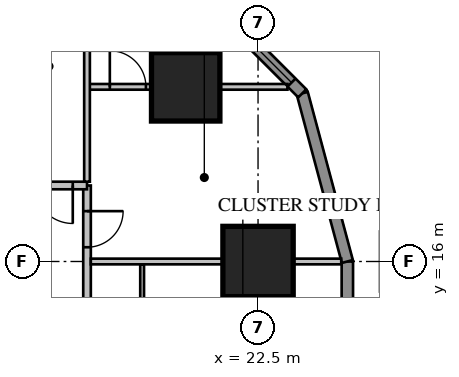
"""IFC4 building model, lengths in metres.
Left out: names, types, materials, properties, quantities, classifications, styles, units other than length and angle.
Written with IfcOpenShell. Run it as: python <this file> out.ifc"""

import sys

from ifc_helpers import new_model, si_unit, direction, frame, frame_2d, origin, origin_2d, place, context, subcontext, project, spatial, rectangle, extrude, element, fill, save


model = new_model("IFC4")
c1 = context("Model", 3, precision=1e-05, world=origin(), true_north=direction((0.0, 1.0)))
c2 = subcontext(c1, "Body", "Model", "MODEL_VIEW")
j1 = project(units=[si_unit("LENGTHUNIT", "METRE"), si_unit("PLANEANGLEUNIT", "RADIAN")], contexts=[c1])
p1 = place(None, origin())
s1 = spatial("IfcSite", under=j1, at=p1, CompositionType="ELEMENT")
p2 = place(p1, origin())
s2 = spatial("IfcBuilding", under=s1, at=p2, CompositionType="ELEMENT")
p3 = place(p2, frame((0.0, 0.0, 27.55)))
s3 = spatial("IfcBuildingStorey", under=s2, at=p3, CompositionType="ELEMENT", Elevation=27.55)
p4 = place(p3, frame((22.5, 16.0, 0.0), z_axis=(0.0, 0.0, 1.0), x_axis=(1.0, 0.0, 0.0)))
e1 = element("IfcColumn", 1, at=p4, inside=s3, PredefinedType="COLUMN", context=c2, shape_type="SweptSolid", body=[
    extrude(rectangle(XDim=1.85, YDim=1.85, at=origin_2d()), origin(), (0.0, 0.0, 1.0), 3.85),
])
p5 = place(p3, frame((20.596, 20.596, 0.0), z_axis=(0.0, 0.0, 1.0), x_axis=(1.0, 0.0, 0.0)))
e2 = element("IfcColumn", 2, at=p5, inside=s3, PredefinedType="COLUMN", context=c2, shape_type="SweptSolid", body=[
    extrude(rectangle(XDim=1.8, YDim=1.8, at=origin_2d()), origin(), (0.0, 0.0, 1.0), 3.85),
])
p6 = place(p3, frame((24.85, -16.0, 0.0), z_axis=(0.0, 0.0, 1.0), x_axis=(0.0, 1.0, 0.0)))
e3 = element("IfcWall", 3, at=p6, inside=s3, PredefinedType="SOLIDWALL", context=c2, shape_type="SweptSolid", body=[
    extrude(rectangle(XDim=32.0, YDim=0.3, at=frame_2d((16.0, 0.0))), origin(), (0.0, 0.0, 1.0), 3.65),
])
p7 = place(p6, frame((1.2, 0.0, 0.75)))
e4 = element("IfcOpeningElement", 4, at=p7, cuts=e3, PredefinedType="OPENING", context=c2, shape_type="SweptSolid", body=[
    extrude(rectangle(XDim=1.6, YDim=1.8, at=frame_2d((0.8, 0.9))), frame((0.0, 0.17, 0.0), z_axis=(0.0, -1.0, 0.0), x_axis=(1.0, 0.0, 0.0)), (0.0, 0.0, 1.0), 0.34),
])
p8 = place(p6, frame((5.2, 0.0, 0.75)))
e5 = element("IfcOpeningElement", 5, at=p8, cuts=e3, PredefinedType="OPENING", context=c2, shape_type="SweptSolid", body=[
    extrude(rectangle(XDim=1.6, YDim=1.8, at=frame_2d((0.8, 0.9))), frame((0.0, 0.17, 0.0), z_axis=(0.0, -1.0, 0.0), x_axis=(1.0, 0.0, 0.0)), (0.0, 0.0, 1.0), 0.34),
])
p9 = place(p6, frame((17.2, 0.0, 0.75)))
e6 = element("IfcOpeningElement", 6, at=p9, cuts=e3, PredefinedType="OPENING", context=c2, shape_type="SweptSolid", body=[
    extrude(rectangle(XDim=1.6, YDim=1.8, at=frame_2d((0.8, 0.9))), frame((0.0, 0.17, 0.0), z_axis=(0.0, -1.0, 0.0), x_axis=(1.0, 0.0, 0.0)), (0.0, 0.0, 1.0), 0.34),
])
p10 = place(p6, frame((21.2, 0.0, 0.75)))
e7 = element("IfcOpeningElement", 7, at=p10, cuts=e3, PredefinedType="OPENING", context=c2, shape_type="SweptSolid", body=[
    extrude(rectangle(XDim=1.6, YDim=1.8, at=frame_2d((0.8, 0.9))), frame((0.0, 0.17, 0.0), z_axis=(0.0, -1.0, 0.0), x_axis=(1.0, 0.0, 0.0)), (0.0, 0.0, 1.0), 0.34),
])
p11 = place(p6, frame((25.2, 0.0, 0.75)))
e8 = element("IfcOpeningElement", 8, at=p11, cuts=e3, PredefinedType="OPENING", context=c2, shape_type="SweptSolid", body=[
    extrude(rectangle(XDim=1.6, YDim=1.8, at=frame_2d((0.8, 0.9))), frame((0.0, 0.17, 0.0), z_axis=(0.0, -1.0, 0.0), x_axis=(1.0, 0.0, 0.0)), (0.0, 0.0, 1.0), 0.34),
])
p12 = place(p6, frame((29.2, 0.0, 0.75)))
e9 = element("IfcOpeningElement", 9, at=p12, cuts=e3, PredefinedType="OPENING", context=c2, shape_type="SweptSolid", body=[
    extrude(rectangle(XDim=1.6, YDim=1.8, at=frame_2d((0.8, 0.9))), frame((0.0, 0.17, 0.0), z_axis=(0.0, -1.0, 0.0), x_axis=(1.0, 0.0, 0.0)), (0.0, 0.0, 1.0), 0.34),
])
p13 = place(p6, frame((8.8, 0.0, 0.75)))
e10 = element("IfcOpeningElement", 10, at=p13, cuts=e3, PredefinedType="OPENING", context=c2, shape_type="SweptSolid", body=[
    extrude(rectangle(XDim=2.4, YDim=1.8, at=frame_2d((1.2, 0.9))), frame((0.0, 0.17, 0.0), z_axis=(0.0, -1.0, 0.0), x_axis=(1.0, 0.0, 0.0)), (0.0, 0.0, 1.0), 0.34),
])
p14 = place(p6, frame((13.812, 0.0, 0.0)))
e11 = element("IfcOpeningElement", 11, at=p14, cuts=e3, PredefinedType="OPENING", context=c2, shape_type="SweptSolid", body=[
    extrude(rectangle(XDim=1.0, YDim=2.4, at=frame_2d((0.5, 1.2))), frame((0.0, 0.17, 0.0), z_axis=(0.0, -1.0, 0.0), x_axis=(1.0, 0.0, 0.0)), (0.0, 0.0, 1.0), 0.34),
])
p15 = place(p3, frame((24.85, 16.0, 0.0), z_axis=(0.0, 0.0, 1.0), x_axis=(-0.258839972501, 0.965920218567, 0.0)))
e12 = element("IfcWall", 12, at=p15, inside=s3, PredefinedType="SOLIDWALL", context=c2, shape_type="SweptSolid", body=[
    extrude(rectangle(XDim=4.581, YDim=0.3, at=frame_2d((2.291, 0.0))), origin(), (0.0, 0.0, 1.0), 3.65),
])
p16 = place(p3, frame((23.664, 20.425, 0.0), z_axis=(0.0, 0.0, 1.0), x_axis=(-0.707106781187, 0.707106781187, 0.0)))
e13 = element("IfcWall", 13, at=p16, inside=s3, PredefinedType="SOLIDWALL", context=c2, shape_type="SweptSolid", body=[
    extrude(rectangle(XDim=4.581, YDim=0.3, at=frame_2d((2.291, 0.0))), origin(), (0.0, 0.0, 1.0), 3.65),
])
p17 = place(p16, frame((0.4, 0.0, 0.75)))
e14 = element("IfcOpeningElement", 14, at=p17, cuts=e13, PredefinedType="OPENING", context=c2, shape_type="SweptSolid", body=[
    extrude(rectangle(XDim=3.781, YDim=1.8, at=frame_2d((1.891, 0.9))), frame((0.0, 0.17, 0.0), z_axis=(0.0, -1.0, 0.0), x_axis=(1.0, 0.0, 0.0)), (0.0, 0.0, 1.0), 0.34),
])
p18 = place(p3, frame((18.0, -18.0, 0.0), z_axis=(0.0, 0.0, 1.0), x_axis=(0.0, 1.0, 0.0)))
e15 = element("IfcWall", 15, at=p18, inside=s3, PredefinedType="PARTITIONING", context=c2, shape_type="SweptSolid", body=[
    extrude(rectangle(XDim=36.0, YDim=0.2, at=frame_2d((18.0, 0.0))), origin(), (0.0, 0.0, 1.0), 3.65),
])
p19 = place(p18, frame((10.4, 0.0, 0.0)))
e16 = element("IfcOpeningElement", 16, at=p19, cuts=e15, PredefinedType="OPENING", context=c2, shape_type="SweptSolid", body=[
    extrude(rectangle(XDim=1.0, YDim=2.1, at=frame_2d((0.5, 1.05))), frame((0.0, 0.12, 0.0), z_axis=(0.0, -1.0, 0.0), x_axis=(1.0, 0.0, 0.0)), (0.0, 0.0, 1.0), 0.24),
])
p20 = place(p18, frame((0.375, 0.0, 0.0)))
e17 = element("IfcOpeningElement", 17, at=p20, cuts=e15, PredefinedType="OPENING", context=c2, shape_type="SweptSolid", body=[
    extrude(rectangle(XDim=1.0, YDim=2.1, at=frame_2d((0.5, 1.05))), frame((0.0, 0.12, 0.0), z_axis=(0.0, -1.0, 0.0), x_axis=(1.0, 0.0, 0.0)), (0.0, 0.0, 1.0), 0.24),
])
p21 = place(p18, frame((34.375, 0.0, 0.0)))
e18 = element("IfcOpeningElement", 18, at=p21, cuts=e15, PredefinedType="OPENING", context=c2, shape_type="SweptSolid", body=[
    extrude(rectangle(XDim=0.95, YDim=2.1, at=frame_2d((0.475, 1.05))), frame((0.0, 0.12, 0.0), z_axis=(0.0, -1.0, 0.0), x_axis=(1.0, 0.0, 0.0)), (0.0, 0.0, 1.0), 0.24),
])
p22 = place(p3, frame((19.45, -15.925, 0.0), z_axis=(0.0, 0.0, 1.0), x_axis=(0.0, 1.0, 0.0)))
e19 = element("IfcWall", 19, at=p22, inside=s3, PredefinedType="PARTITIONING", context=c2, shape_type="SweptSolid", body=[
    extrude(rectangle(XDim=31.85, YDim=0.1, at=frame_2d((15.925, 0.0))), origin(), (0.0, 0.0, 1.0), 3.65),
])
p23 = place(p22, frame((10.125, 0.0, 0.0)))
e20 = element("IfcOpeningElement", 20, at=p23, cuts=e19, PredefinedType="OPENING", context=c2, shape_type="SweptSolid", body=[
    extrude(rectangle(XDim=1.0, YDim=2.1, at=frame_2d((0.5, 1.05))), frame((0.0, 0.07, 0.0), z_axis=(0.0, -1.0, 0.0), x_axis=(1.0, 0.0, 0.0)), (0.0, 0.0, 1.0), 0.14),
])
p24 = place(p22, frame((8.3, 0.0, 0.0)))
e21 = element("IfcOpeningElement", 21, at=p24, cuts=e19, PredefinedType="OPENING", context=c2, shape_type="SweptSolid", body=[
    extrude(rectangle(XDim=0.8, YDim=2.1, at=frame_2d((0.4, 1.05))), frame((0.0, 0.07, 0.0), z_axis=(0.0, -1.0, 0.0), x_axis=(1.0, 0.0, 0.0)), (0.0, 0.0, 1.0), 0.14),
])
p25 = place(p22, frame((1.725, 0.0, 0.0)))
e22 = element("IfcOpeningElement", 22, at=p25, cuts=e19, PredefinedType="OPENING", context=c2, shape_type="SweptSolid", body=[
    extrude(rectangle(XDim=0.95, YDim=2.1, at=frame_2d((0.475, 1.05))), frame((0.0, 0.07, 0.0), z_axis=(0.0, -1.0, 0.0), x_axis=(1.0, 0.0, 0.0)), (0.0, 0.0, 1.0), 0.14),
])
p26 = place(p22, frame((5.725, 0.0, 0.0)))
e23 = element("IfcOpeningElement", 23, at=p26, cuts=e19, PredefinedType="OPENING", context=c2, shape_type="SweptSolid", body=[
    extrude(rectangle(XDim=0.95, YDim=2.1, at=frame_2d((0.475, 1.05))), frame((0.0, 0.07, 0.0), z_axis=(0.0, -1.0, 0.0), x_axis=(1.0, 0.0, 0.0)), (0.0, 0.0, 1.0), 0.14),
])
p27 = place(p22, frame((17.725, 0.0, 0.0)))
e24 = element("IfcOpeningElement", 24, at=p27, cuts=e19, PredefinedType="OPENING", context=c2, shape_type="SweptSolid", body=[
    extrude(rectangle(XDim=0.95, YDim=2.1, at=frame_2d((0.475, 1.05))), frame((0.0, 0.07, 0.0), z_axis=(0.0, -1.0, 0.0), x_axis=(1.0, 0.0, 0.0)), (0.0, 0.0, 1.0), 0.14),
])
p28 = place(p22, frame((21.725, 0.0, 0.0)))
e25 = element("IfcOpeningElement", 25, at=p28, cuts=e19, PredefinedType="OPENING", context=c2, shape_type="SweptSolid", body=[
    extrude(rectangle(XDim=0.95, YDim=2.1, at=frame_2d((0.475, 1.05))), frame((0.0, 0.07, 0.0), z_axis=(0.0, -1.0, 0.0), x_axis=(1.0, 0.0, 0.0)), (0.0, 0.0, 1.0), 0.14),
])
p29 = place(p22, frame((25.725, 0.0, 0.0)))
e26 = element("IfcOpeningElement", 26, at=p29, cuts=e19, PredefinedType="OPENING", context=c2, shape_type="SweptSolid", body=[
    extrude(rectangle(XDim=0.95, YDim=2.1, at=frame_2d((0.475, 1.05))), frame((0.0, 0.07, 0.0), z_axis=(0.0, -1.0, 0.0), x_axis=(1.0, 0.0, 0.0)), (0.0, 0.0, 1.0), 0.14),
])
p30 = place(p22, frame((29.725, 0.0, 0.0)))
e27 = element("IfcOpeningElement", 27, at=p30, cuts=e19, PredefinedType="OPENING", context=c2, shape_type="SweptSolid", body=[
    extrude(rectangle(XDim=0.95, YDim=2.1, at=frame_2d((0.475, 1.05))), frame((0.0, 0.07, 0.0), z_axis=(0.0, -1.0, 0.0), x_axis=(1.0, 0.0, 0.0)), (0.0, 0.0, 1.0), 0.14),
])
p31 = place(p3, frame((18.1, 16.0, 0.0), z_axis=(0.0, 0.0, 1.0), x_axis=(1.0, 0.0, 0.0)))
e28 = element("IfcWall", 28, at=p31, inside=s3, PredefinedType="PARTITIONING", context=c2, shape_type="SweptSolid", body=[
    extrude(rectangle(XDim=6.589, YDim=0.15, at=frame_2d((3.295, 0.0))), origin(), (0.0, 0.0, 1.0), 3.65),
])
p32 = place(p3, frame((18.065, 20.596, 0.0), z_axis=(0.0, 0.0, 1.0), x_axis=(1.0, 0.0, 0.0)))
e29 = element("IfcWall", 29, at=p32, inside=s3, PredefinedType="PARTITIONING", context=c2, shape_type="SweptSolid", body=[
    extrude(rectangle(XDim=5.209, YDim=0.15, at=frame_2d((2.604, 0.0))), origin(), (0.0, 0.0, 1.0), 3.65),
])
p33 = place(p32, frame((0.535, 0.0, 0.0)))
e30 = element("IfcOpeningElement", 30, at=p33, cuts=e29, PredefinedType="OPENING", context=c2, shape_type="SweptSolid", body=[
    extrude(rectangle(XDim=0.95, YDim=2.1, at=frame_2d((0.475, 1.05))), frame((0.0, 0.095, 0.0), z_axis=(0.0, -1.0, 0.0), x_axis=(1.0, 0.0, 0.0)), (0.0, 0.0, 1.0), 0.19),
])
p34 = place(p3, frame((18.0, 18.0, 0.0), z_axis=(0.0, 0.0, 1.0), x_axis=(-1.0, 0.0, 0.0)))
e31 = element("IfcWall", 31, at=p34, inside=s3, PredefinedType="PARTITIONING", context=c2, shape_type="SweptSolid", body=[
    extrude(rectangle(XDim=36.0, YDim=0.2, at=frame_2d((18.0, 0.0))), origin(), (0.0, 0.0, 1.0), 3.65),
])
p35 = place(p34, frame((0.375, 0.0, 0.0)))
e32 = element("IfcOpeningElement", 32, at=p35, cuts=e31, PredefinedType="OPENING", context=c2, shape_type="SweptSolid", body=[
    extrude(rectangle(XDim=1.0, YDim=2.1, at=frame_2d((0.5, 1.05))), frame((0.0, 0.12, 0.0), z_axis=(0.0, -1.0, 0.0), x_axis=(1.0, 0.0, 0.0)), (0.0, 0.0, 1.0), 0.24),
])
p36 = place(p34, frame((3.8, 0.0, 0.0)))
e33 = element("IfcOpeningElement", 33, at=p36, cuts=e31, PredefinedType="OPENING", context=c2, shape_type="SweptSolid", body=[
    extrude(rectangle(XDim=0.95, YDim=2.1, at=frame_2d((0.475, 1.05))), frame((0.0, 0.12, 0.0), z_axis=(0.0, -1.0, 0.0), x_axis=(1.0, 0.0, 0.0)), (0.0, 0.0, 1.0), 0.24),
])
p37 = place(p34, frame((7.8, 0.0, 0.0)))
e34 = element("IfcOpeningElement", 34, at=p37, cuts=e31, PredefinedType="OPENING", context=c2, shape_type="SweptSolid", body=[
    extrude(rectangle(XDim=0.95, YDim=2.1, at=frame_2d((0.475, 1.05))), frame((0.0, 0.12, 0.0), z_axis=(0.0, -1.0, 0.0), x_axis=(1.0, 0.0, 0.0)), (0.0, 0.0, 1.0), 0.24),
])
p38 = place(p34, frame((19.8, 0.0, 0.0)))
e35 = element("IfcOpeningElement", 35, at=p38, cuts=e31, PredefinedType="OPENING", context=c2, shape_type="SweptSolid", body=[
    extrude(rectangle(XDim=0.95, YDim=2.1, at=frame_2d((0.475, 1.05))), frame((0.0, 0.12, 0.0), z_axis=(0.0, -1.0, 0.0), x_axis=(1.0, 0.0, 0.0)), (0.0, 0.0, 1.0), 0.24),
])
p39 = place(p34, frame((23.8, 0.0, 0.0)))
e36 = element("IfcOpeningElement", 36, at=p39, cuts=e31, PredefinedType="OPENING", context=c2, shape_type="SweptSolid", body=[
    extrude(rectangle(XDim=0.95, YDim=2.1, at=frame_2d((0.475, 1.05))), frame((0.0, 0.12, 0.0), z_axis=(0.0, -1.0, 0.0), x_axis=(1.0, 0.0, 0.0)), (0.0, 0.0, 1.0), 0.24),
])
p40 = place(p34, frame((27.8, 0.0, 0.0)))
e37 = element("IfcOpeningElement", 37, at=p40, cuts=e31, PredefinedType="OPENING", context=c2, shape_type="SweptSolid", body=[
    extrude(rectangle(XDim=0.95, YDim=2.1, at=frame_2d((0.475, 1.05))), frame((0.0, 0.12, 0.0), z_axis=(0.0, -1.0, 0.0), x_axis=(1.0, 0.0, 0.0)), (0.0, 0.0, 1.0), 0.24),
])
p41 = place(p34, frame((31.8, 0.0, 0.0)))
e38 = element("IfcOpeningElement", 38, at=p41, cuts=e31, PredefinedType="OPENING", context=c2, shape_type="SweptSolid", body=[
    extrude(rectangle(XDim=0.95, YDim=2.1, at=frame_2d((0.475, 1.05))), frame((0.0, 0.12, 0.0), z_axis=(0.0, -1.0, 0.0), x_axis=(1.0, 0.0, 0.0)), (0.0, 0.0, 1.0), 0.24),
])
p42 = place(p34, frame((34.375, 0.0, 0.0)))
e39 = element("IfcOpeningElement", 39, at=p42, cuts=e31, PredefinedType="OPENING", context=c2, shape_type="SweptSolid", body=[
    extrude(rectangle(XDim=0.95, YDim=2.1, at=frame_2d((0.475, 1.05))), frame((0.0, 0.12, 0.0), z_axis=(0.0, -1.0, 0.0), x_axis=(1.0, 0.0, 0.0)), (0.0, 0.0, 1.0), 0.24),
])
p43 = place(p34, frame((11.2, 0.0, 0.0)))
e40 = element("IfcOpeningElement", 40, at=p43, cuts=e31, PredefinedType="OPENING", context=c2, shape_type="SweptSolid", body=[
    extrude(rectangle(XDim=1.0, YDim=2.1, at=frame_2d((0.5, 1.05))), frame((0.0, 0.12, 0.0), z_axis=(0.0, -1.0, 0.0), x_axis=(1.0, 0.0, 0.0)), (0.0, 0.0, 1.0), 0.24),
])
p44 = place(p3, frame((18.0, 18.1, 0.0), z_axis=(0.0, 0.0, 1.0), x_axis=(0.0, 1.0, 0.0)))
e41 = element("IfcWall", 41, at=p44, inside=s3, PredefinedType="PARTITIONING", context=c2, shape_type="SweptSolid", body=[
    extrude(rectangle(XDim=6.053, YDim=0.15, at=frame_2d((3.027, 0.0))), origin(), (0.0, 0.0, 1.0), 3.65),
])
p45 = place(p17, origin())
e42 = element("IfcWindow", 42, at=p45, inside=s3, PartitioningType="SINGLE_PANEL", PredefinedType="WINDOW", context=c2, shape_type="SweptSolid", body=[
    extrude(rectangle(XDim=3.781, YDim=1.8, at=frame_2d((1.891, 0.9))), frame((0.0, 0.03, 0.0), z_axis=(0.0, -1.0, 0.0), x_axis=(1.0, 0.0, 0.0)), (0.0, 0.0, 1.0), 0.06),
])
fill(e14, e42)
p46 = place(p21, origin())
e43 = element("IfcDoor", 43, at=p46, inside=s3, OperationType="SINGLE_SWING_RIGHT", PredefinedType="DOOR", context=c2, shape_type="SweptSolid", body=[
    extrude(rectangle(XDim=0.95, YDim=2.1, at=frame_2d((0.475, 1.05))), frame((0.0, 0.025, 0.0), z_axis=(0.0, -1.0, 0.0), x_axis=(1.0, 0.0, 0.0)), (0.0, 0.0, 1.0), 0.05),
])
fill(e18, e43)
p47 = place(p33, origin())
e44 = element("IfcDoor", 44, at=p47, inside=s3, OperationType="SINGLE_SWING_LEFT", PredefinedType="DOOR", context=c2, shape_type="SweptSolid", body=[
    extrude(rectangle(XDim=0.95, YDim=2.1, at=frame_2d((0.475, 1.05))), frame((0.0, 0.025, 0.0), z_axis=(0.0, -1.0, 0.0), x_axis=(1.0, 0.0, 0.0)), (0.0, 0.0, 1.0), 0.05),
])
fill(e30, e44)
p48 = place(p35, origin())
e45 = element("IfcDoor", 45, at=p48, inside=s3, OperationType="SINGLE_SWING_LEFT", PredefinedType="DOOR", context=c2, shape_type="SweptSolid", body=[
    extrude(rectangle(XDim=1.0, YDim=2.1, at=frame_2d((0.5, 1.05))), frame((0.0, 0.025, 0.0), z_axis=(0.0, -1.0, 0.0), x_axis=(1.0, 0.0, 0.0)), (0.0, 0.0, 1.0), 0.05),
])
fill(e32, e45)
save(model, sys.argv[1])
